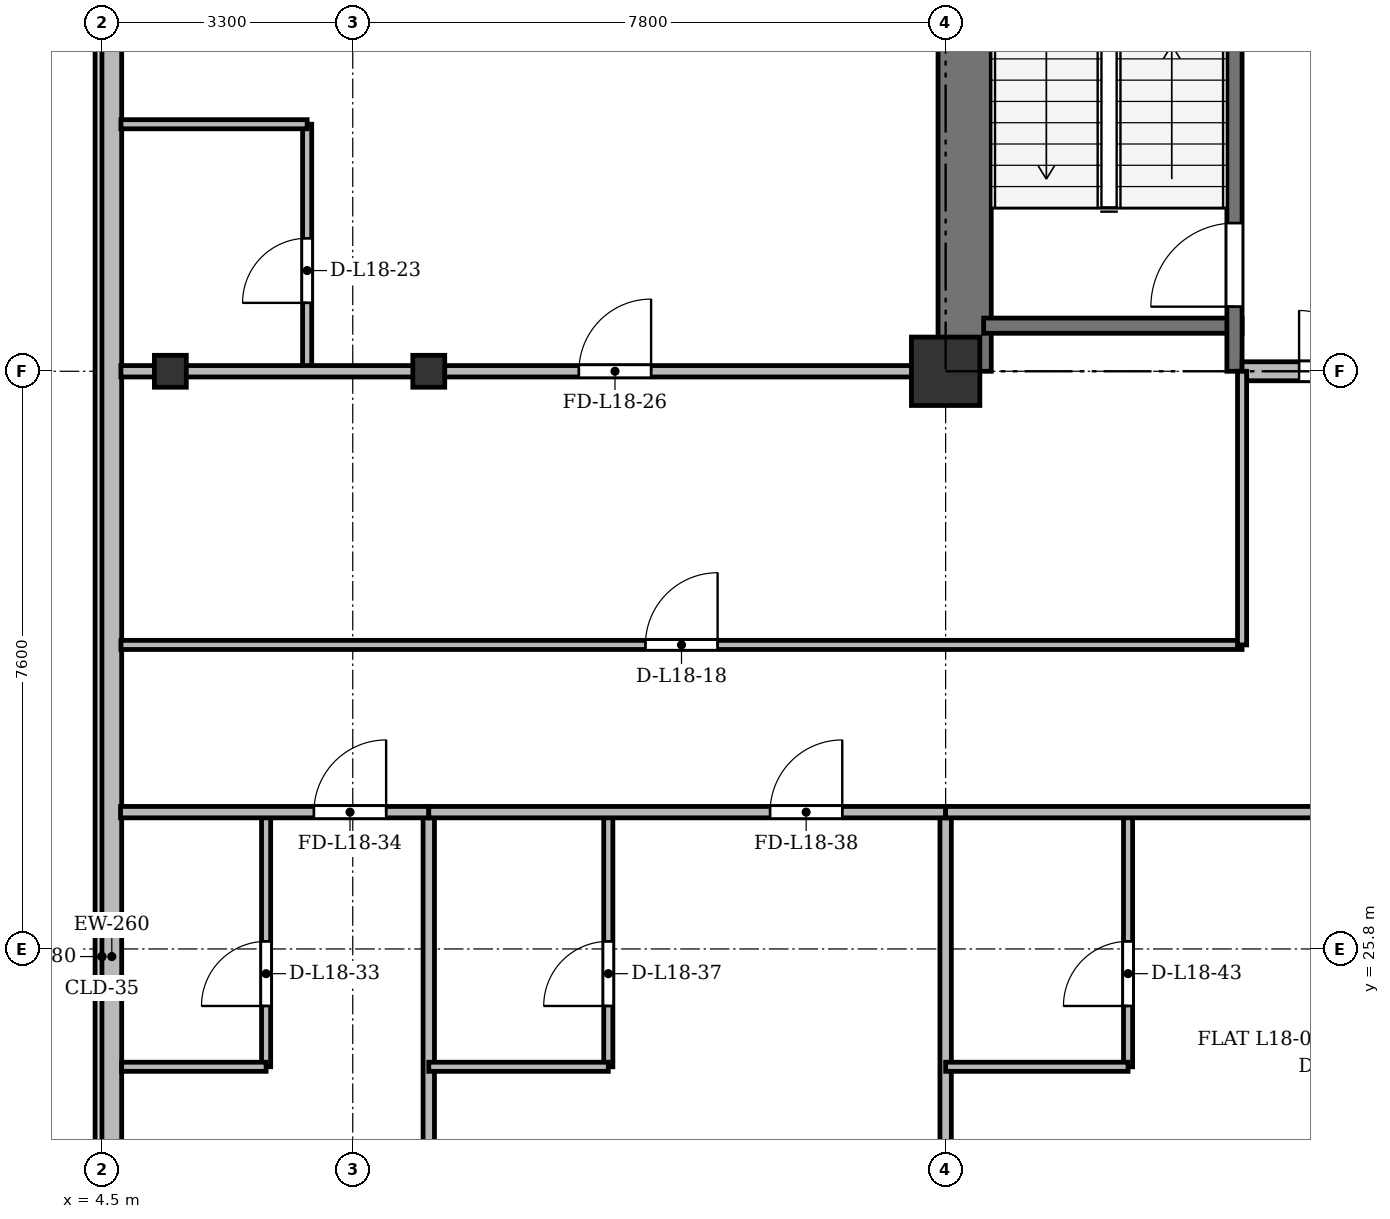
"""IFC4 building model, lengths in metres.
Left out: names, types, materials, properties, quantities, classifications, styles, units other than length and angle.
Written with IfcOpenShell. Run it as: python <this file> out.ifc"""

import sys

from ifc_helpers import new_model, si_unit, direction, frame, frame_2d, origin, origin_2d, place, context, subcontext, project, spatial, rectangle, i_section, extrude, source, transform, mapped, element, fill, save


model = new_model("IFC4")
c1 = context("Model", 3, precision=1e-05, world=origin(), true_north=direction((0.0, 1.0)))
c2 = subcontext(c1, "Body", "Model", "MODEL_VIEW")
j1 = project(units=[si_unit("LENGTHUNIT", "METRE"), si_unit("PLANEANGLEUNIT", "RADIAN")], contexts=[c1])
p1 = place(None, origin())
s1 = spatial("IfcSite", under=j1, at=p1, CompositionType="ELEMENT")
p2 = place(p1, origin())
s2 = spatial("IfcBuilding", under=s1, at=p2, CompositionType="ELEMENT")
p3 = place(p2, frame((0.0, 0.0, 70.3)))
s3 = spatial("IfcBuildingStorey", under=s2, at=p3, CompositionType="ELEMENT", Elevation=70.3)
m1 = source(origin(), c2, "Body", "SweptSolid", [
    extrude(i_section(OverallWidth=0.42, OverallDepth=0.42, WebThickness=0.026, FlangeThickness=0.04, at=origin_2d()), origin(), (0.0, 0.0, 1.0), 3.6),
])
for number, where, z_axis, x_axis in (
    (1, (5.4, 33.4, 0.0), (0.0, 0.0, 1.0), (1.0, 0.0, 0.0)),
    (2, (8.8, 33.4, 0.0), (0.0, 0.0, 1.0), (1.0, 0.0, 0.0)),
):
    element("IfcColumn", number, at=place(p3, frame(where, z_axis=z_axis, x_axis=x_axis)), inside=s3, PredefinedType="COLUMN", context=c2, shape_type="MappedRepresentation", body=[
        mapped(m1, transform((0.0, 0.0, 0.0), x_axis=(1.0, 0.0, 0.0), y_axis=(0.0, 1.0, 0.0), z_axis=(0.0, 0.0, 1.0), scale=1.0)),
    ])
m2 = source(origin(), c2, "Body", "SweptSolid", [
    extrude(rectangle(XDim=0.9, YDim=0.9, at=origin_2d()), origin(), (0.0, 0.0, 1.0), 3.6),
])
p4 = place(p3, frame((15.6, 33.4, 0.0), z_axis=(0.0, 0.0, 1.0), x_axis=(1.0, 0.0, 0.0)))
e3 = element("IfcColumn", 3, at=p4, inside=s3, PredefinedType="COLUMN", context=c2, shape_type="MappedRepresentation", body=[
    mapped(m2, transform((0.0, 0.0, 0.0), x_axis=(1.0, 0.0, 0.0), y_axis=(0.0, 1.0, 0.0), z_axis=(0.0, 0.0, 1.0), scale=1.0)),
])
p5 = place(p3, frame((4.63, 5.9, 0.0), z_axis=(0.0, 0.0, 1.0), x_axis=(0.0, 1.0, 0.0)))
e4 = element("IfcWall", 4, at=p5, inside=s3, PredefinedType="SOLIDWALL", context=c2, shape_type="SweptSolid", body=[
    extrude(rectangle(XDim=39.6, YDim=0.26, at=frame_2d((19.8, 0.0))), origin(), (0.0, 0.0, 1.0), 3.22),
])
p6 = place(p5, frame((1.45, 0.0, 0.92)))
e5 = element("IfcOpeningElement", 5, at=p6, cuts=e4, PredefinedType="OPENING", context=c2, shape_type="SweptSolid", body=[
    extrude(rectangle(XDim=1.2, YDim=1.65, at=frame_2d((0.6, 0.825))), frame((0.0, 0.14, 0.0), z_axis=(0.0, -1.0, 0.0), x_axis=(1.0, 0.0, 0.0)), (0.0, 0.0, 1.0), 0.28),
])
p7 = place(p5, frame((4.2, 0.0, 0.92)))
e6 = element("IfcOpeningElement", 6, at=p7, cuts=e4, PredefinedType="OPENING", context=c2, shape_type="SweptSolid", body=[
    extrude(rectangle(XDim=2.6, YDim=1.9, at=frame_2d((1.3, 0.95))), frame((0.0, 0.14, 0.0), z_axis=(0.0, -1.0, 0.0), x_axis=(1.0, 0.0, 0.0)), (0.0, 0.0, 1.0), 0.28),
])
p8 = place(p5, frame((8.4, 0.0, 0.92)))
e7 = element("IfcOpeningElement", 7, at=p8, cuts=e4, PredefinedType="OPENING", context=c2, shape_type="SweptSolid", body=[
    extrude(rectangle(XDim=2.6, YDim=1.9, at=frame_2d((1.3, 0.95))), frame((0.0, 0.14, 0.0), z_axis=(0.0, -1.0, 0.0), x_axis=(1.0, 0.0, 0.0)), (0.0, 0.0, 1.0), 0.28),
])
p9 = place(p5, frame((33.9, 0.0, 0.92)))
e8 = element("IfcOpeningElement", 8, at=p9, cuts=e4, PredefinedType="OPENING", context=c2, shape_type="SweptSolid", body=[
    extrude(rectangle(XDim=1.2, YDim=1.65, at=frame_2d((0.6, 0.825))), frame((0.0, 0.14, 0.0), z_axis=(0.0, -1.0, 0.0), x_axis=(1.0, 0.0, 0.0)), (0.0, 0.0, 1.0), 0.28),
])
p10 = place(p5, frame((37.25, 0.0, 0.92)))
e9 = element("IfcOpeningElement", 9, at=p10, cuts=e4, PredefinedType="OPENING", context=c2, shape_type="SweptSolid", body=[
    extrude(rectangle(XDim=1.2, YDim=1.65, at=frame_2d((0.6, 0.825))), frame((0.0, 0.14, 0.0), z_axis=(0.0, -1.0, 0.0), x_axis=(1.0, 0.0, 0.0)), (0.0, 0.0, 1.0), 0.28),
])
p11 = place(p3, frame((15.85, 33.4, 0.0), z_axis=(0.0, 0.0, 1.0), x_axis=(0.0, 1.0, 0.0)))
e10 = element("IfcWall", 10, at=p11, inside=s3, PredefinedType="SHEAR", context=c2, shape_type="SweptSolid", body=[
    extrude(rectangle(XDim=11.7, YDim=0.7, at=frame_2d((5.85, 0.0))), origin(), (0.0, 0.0, 1.0), 3.22),
])
p12 = place(p3, frame((16.1, 34.0, 0.0), z_axis=(0.0, 0.0, 1.0), x_axis=(1.0, 0.0, 0.0)))
e11 = element("IfcWall", 11, at=p12, inside=s3, PredefinedType="SHEAR", context=c2, shape_type="SweptSolid", body=[
    extrude(rectangle(XDim=3.4, YDim=0.2, at=frame_2d((1.7, 0.0))), origin(), (0.0, 0.0, 1.0), 3.22),
])
p13 = place(p3, frame((19.4, 33.4, 0.0), z_axis=(0.0, 0.0, 1.0), x_axis=(0.0, 1.0, 0.0)))
e12 = element("IfcWall", 12, at=p13, inside=s3, PredefinedType="SHEAR", context=c2, shape_type="SweptSolid", body=[
    extrude(rectangle(XDim=11.1, YDim=0.2, at=frame_2d((5.55, 0.0))), origin(), (0.0, 0.0, 1.0), 3.22),
])
p14 = place(p13, frame((0.85, 0.0, 0.0)))
e13 = element("IfcOpeningElement", 13, at=p14, cuts=e12, PredefinedType="OPENING", context=c2, shape_type="SweptSolid", body=[
    extrude(rectangle(XDim=1.1, YDim=2.15, at=frame_2d((0.55, 1.075))), frame((0.0, 0.11, 0.0), z_axis=(0.0, -1.0, 0.0), x_axis=(1.0, 0.0, 0.0)), (0.0, 0.0, 1.0), 0.22),
])
p15 = place(p3, frame((19.5, 33.4, 0.0), z_axis=(0.0, 0.0, 1.0), x_axis=(1.0, 0.0, 0.0)))
e14 = element("IfcWall", 14, at=p15, inside=s3, PredefinedType="PARTITIONING", context=c2, shape_type="SweptSolid", body=[
    extrude(rectangle(XDim=6.8, YDim=0.25, at=frame_2d((3.4, 0.0))), origin(), (0.0, 0.0, 1.0), 2.57),
])
p16 = place(p15, frame((0.75, 0.0, 0.0)))
e15 = element("IfcOpeningElement", 15, at=p16, cuts=e14, PredefinedType="OPENING", context=c2, shape_type="SweptSolid", body=[
    extrude(rectangle(XDim=1.6, YDim=2.2, at=frame_2d((0.8, 1.1))), frame((0.0, 0.135, 0.0), z_axis=(0.0, -1.0, 0.0), x_axis=(1.0, 0.0, 0.0)), (0.0, 0.0, 1.0), 0.27),
])
p17 = place(p3, frame((4.75, 29.8, 0.0), z_axis=(0.0, 0.0, 1.0), x_axis=(1.0, 0.0, 0.0)))
e16 = element("IfcWall", 16, at=p17, inside=s3, PredefinedType="PARTITIONING", context=c2, shape_type="SweptSolid", body=[
    extrude(rectangle(XDim=14.75, YDim=0.12, at=frame_2d((7.375, 0.0))), origin(), (0.0, 0.0, 1.0), 2.632),
])
p18 = place(p17, frame((6.9, 0.0, 0.0)))
e17 = element("IfcOpeningElement", 17, at=p18, cuts=e16, PredefinedType="OPENING", context=c2, shape_type="SweptSolid", body=[
    extrude(rectangle(XDim=0.95, YDim=2.15, at=frame_2d((0.475, 1.075))), frame((0.0, 0.07, 0.0), z_axis=(0.0, -1.0, 0.0), x_axis=(1.0, 0.0, 0.0)), (0.0, 0.0, 1.0), 0.14),
])
p19 = place(p3, frame((19.5, 29.8, 0.0), z_axis=(0.0, 0.0, 1.0), x_axis=(0.0, 1.0, 0.0)))
e18 = element("IfcWall", 18, at=p19, inside=s3, PredefinedType="PARTITIONING", context=c2, shape_type="SweptSolid", body=[
    extrude(rectangle(XDim=3.6, YDim=0.12, at=frame_2d((1.8, 0.0))), origin(), (0.0, 0.0, 1.0), 2.57),
])
p20 = place(p3, frame((7.2, 33.4, 0.0), z_axis=(0.0, 0.0, 1.0), x_axis=(0.0, 1.0, 0.0)))
e19 = element("IfcWall", 19, at=p20, inside=s3, PredefinedType="PARTITIONING", context=c2, shape_type="SweptSolid", body=[
    extrude(rectangle(XDim=3.25, YDim=0.12, at=frame_2d((1.625, 0.0))), origin(), (0.0, 0.0, 1.0), 2.57),
])
p21 = place(p20, frame((0.9, 0.0, 0.0)))
e20 = element("IfcOpeningElement", 20, at=p21, cuts=e19, PredefinedType="OPENING", context=c2, shape_type="SweptSolid", body=[
    extrude(rectangle(XDim=0.85, YDim=2.1, at=frame_2d((0.425, 1.05))), frame((0.0, 0.07, 0.0), z_axis=(0.0, -1.0, 0.0), x_axis=(1.0, 0.0, 0.0)), (0.0, 0.0, 1.0), 0.14),
])
p22 = place(p3, frame((4.75, 36.65, 0.0), z_axis=(0.0, 0.0, 1.0), x_axis=(1.0, 0.0, 0.0)))
e21 = element("IfcWall", 21, at=p22, inside=s3, PredefinedType="PARTITIONING", context=c2, shape_type="SweptSolid", body=[
    extrude(rectangle(XDim=2.45, YDim=0.12, at=frame_2d((1.225, 0.0))), origin(), (0.0, 0.0, 1.0), 2.632),
])
p23 = place(p3, frame((4.75, 33.4, 0.0), z_axis=(0.0, 0.0, 1.0), x_axis=(1.0, 0.0, 0.0)))
e22 = element("IfcWall", 22, at=p23, inside=s3, PredefinedType="PARTITIONING", context=c2, shape_type="SweptSolid", body=[
    extrude(rectangle(XDim=10.85, YDim=0.15, at=frame_2d((5.425, 0.0))), origin(), (0.0, 0.0, 1.0), 2.57),
])
p24 = place(p23, frame((6.025, 0.0, 0.0)))
e23 = element("IfcOpeningElement", 23, at=p24, cuts=e22, PredefinedType="OPENING", context=c2, shape_type="SweptSolid", body=[
    extrude(rectangle(XDim=0.95, YDim=2.15, at=frame_2d((0.475, 1.075))), frame((0.0, 0.085, 0.0), z_axis=(0.0, -1.0, 0.0), x_axis=(1.0, 0.0, 0.0)), (0.0, 0.0, 1.0), 0.17),
])
for number, where, z_axis, x_axis in (
    (24, (8.8, 3.145, 0.0), (0.0, 0.0, 1.0), (0.0, 1.0, 0.0)),
    (25, (15.6, 3.145, 0.0), (0.0, 0.0, 1.0), (0.0, 1.0, 0.0)),
):
    element("IfcWall", number, at=place(p3, frame(where, z_axis=z_axis, x_axis=x_axis)), inside=s3, PredefinedType="PARTITIONING", context=c2, shape_type="SweptSolid", body=[
        extrude(rectangle(XDim=24.455, YDim=0.15, at=frame_2d((12.228, 0.0))), origin(), (0.0, 0.0, 1.0), 2.632),
    ])
p25 = place(p3, frame((6.66, 24.25, 0.0), z_axis=(0.0, 0.0, 1.0), x_axis=(0.0, 1.0, 0.0)))
e26 = element("IfcWall", 26, at=p25, inside=s3, PredefinedType="PARTITIONING", context=c2, shape_type="SweptSolid", body=[
    extrude(rectangle(XDim=3.35, YDim=0.12, at=frame_2d((1.675, 0.0))), origin(), (0.0, 0.0, 1.0), 2.82),
])
p26 = place(p25, frame((0.8, 0.0, 0.0)))
e27 = element("IfcOpeningElement", 27, at=p26, cuts=e26, PredefinedType="OPENING", context=c2, shape_type="SweptSolid", body=[
    extrude(rectangle(XDim=0.85, YDim=2.1, at=frame_2d((0.425, 1.05))), frame((0.0, 0.07, 0.0), z_axis=(0.0, -1.0, 0.0), x_axis=(1.0, 0.0, 0.0)), (0.0, 0.0, 1.0), 0.14),
])
p27 = place(p3, frame((4.76, 24.25, 0.0), z_axis=(0.0, 0.0, 1.0), x_axis=(1.0, 0.0, 0.0)))
e28 = element("IfcWall", 28, at=p27, inside=s3, PredefinedType="PARTITIONING", context=c2, shape_type="SweptSolid", body=[
    extrude(rectangle(XDim=1.9, YDim=0.12, at=frame_2d((0.95, 0.0))), origin(), (0.0, 0.0, 1.0), 2.632),
])
p28 = place(p3, frame((4.745, 27.6, 0.0), z_axis=(0.0, 0.0, 1.0), x_axis=(1.0, 0.0, 0.0)))
e29 = element("IfcWall", 29, at=p28, inside=s3, PredefinedType="PARTITIONING", context=c2, shape_type="SweptSolid", body=[
    extrude(rectangle(XDim=4.055, YDim=0.15, at=frame_2d((2.027, 0.0))), origin(), (0.0, 0.0, 1.0), 2.632),
])
p29 = place(p28, frame((2.544, 0.0, 0.0)))
e30 = element("IfcOpeningElement", 30, at=p29, cuts=e29, PredefinedType="OPENING", context=c2, shape_type="SweptSolid", body=[
    extrude(rectangle(XDim=0.95, YDim=2.15, at=frame_2d((0.475, 1.075))), frame((0.0, 0.085, 0.0), z_axis=(0.0, -1.0, 0.0), x_axis=(1.0, 0.0, 0.0)), (0.0, 0.0, 1.0), 0.17),
])
p30 = place(p3, frame((11.162, 24.25, 0.0), z_axis=(0.0, 0.0, 1.0), x_axis=(0.0, 1.0, 0.0)))
e31 = element("IfcWall", 31, at=p30, inside=s3, PredefinedType="PARTITIONING", context=c2, shape_type="SweptSolid", body=[
    extrude(rectangle(XDim=3.35, YDim=0.12, at=frame_2d((1.675, 0.0))), origin(), (0.0, 0.0, 1.0), 2.82),
])
p31 = place(p30, frame((0.8, 0.0, 0.0)))
e32 = element("IfcOpeningElement", 32, at=p31, cuts=e31, PredefinedType="OPENING", context=c2, shape_type="SweptSolid", body=[
    extrude(rectangle(XDim=0.85, YDim=2.1, at=frame_2d((0.425, 1.05))), frame((0.0, 0.07, 0.0), z_axis=(0.0, -1.0, 0.0), x_axis=(1.0, 0.0, 0.0)), (0.0, 0.0, 1.0), 0.14),
])
p32 = place(p3, frame((8.8, 24.25, 0.0), z_axis=(0.0, 0.0, 1.0), x_axis=(1.0, 0.0, 0.0)))
e33 = element("IfcWall", 33, at=p32, inside=s3, PredefinedType="PARTITIONING", context=c2, shape_type="SweptSolid", body=[
    extrude(rectangle(XDim=2.362, YDim=0.12, at=frame_2d((1.181, 0.0))), origin(), (0.0, 0.0, 1.0), 2.632),
])
p33 = place(p3, frame((8.8, 27.6, 0.0), z_axis=(0.0, 0.0, 1.0), x_axis=(1.0, 0.0, 0.0)))
e34 = element("IfcWall", 34, at=p33, inside=s3, PredefinedType="PARTITIONING", context=c2, shape_type="SweptSolid", body=[
    extrude(rectangle(XDim=6.8, YDim=0.15, at=frame_2d((3.4, 0.0))), origin(), (0.0, 0.0, 1.0), 2.632),
])
p34 = place(p33, frame((4.49, 0.0, 0.0)))
e35 = element("IfcOpeningElement", 35, at=p34, cuts=e34, PredefinedType="OPENING", context=c2, shape_type="SweptSolid", body=[
    extrude(rectangle(XDim=0.95, YDim=2.15, at=frame_2d((0.475, 1.075))), frame((0.0, 0.085, 0.0), z_axis=(0.0, -1.0, 0.0), x_axis=(1.0, 0.0, 0.0)), (0.0, 0.0, 1.0), 0.17),
])
p35 = place(p3, frame((18.0, 24.25, 0.0), z_axis=(0.0, 0.0, 1.0), x_axis=(0.0, 1.0, 0.0)))
e36 = element("IfcWall", 36, at=p35, inside=s3, PredefinedType="PARTITIONING", context=c2, shape_type="SweptSolid", body=[
    extrude(rectangle(XDim=3.35, YDim=0.12, at=frame_2d((1.675, 0.0))), origin(), (0.0, 0.0, 1.0), 2.82),
])
p36 = place(p35, frame((0.8, 0.0, 0.0)))
e37 = element("IfcOpeningElement", 37, at=p36, cuts=e36, PredefinedType="OPENING", context=c2, shape_type="SweptSolid", body=[
    extrude(rectangle(XDim=0.85, YDim=2.1, at=frame_2d((0.425, 1.05))), frame((0.0, 0.07, 0.0), z_axis=(0.0, -1.0, 0.0), x_axis=(1.0, 0.0, 0.0)), (0.0, 0.0, 1.0), 0.14),
])
p37 = place(p3, frame((15.6, 24.25, 0.0), z_axis=(0.0, 0.0, 1.0), x_axis=(1.0, 0.0, 0.0)))
e38 = element("IfcWall", 38, at=p37, inside=s3, PredefinedType="PARTITIONING", context=c2, shape_type="SweptSolid", body=[
    extrude(rectangle(XDim=2.4, YDim=0.12, at=frame_2d((1.2, 0.0))), origin(), (0.0, 0.0, 1.0), 2.632),
])
p38 = place(p3, frame((15.6, 27.6, 0.0), z_axis=(0.0, 0.0, 1.0), x_axis=(1.0, 0.0, 0.0)))
e39 = element("IfcWall", 39, at=p38, inside=s3, PredefinedType="PARTITIONING", context=c2, shape_type="SweptSolid", body=[
    extrude(rectangle(XDim=7.8, YDim=0.15, at=frame_2d((3.9, 0.0))), origin(), (0.0, 0.0, 1.0), 2.632),
])
p39 = place(p38, frame((5.172, 0.0, 0.0)))
e40 = element("IfcOpeningElement", 40, at=p39, cuts=e39, PredefinedType="OPENING", context=c2, shape_type="SweptSolid", body=[
    extrude(rectangle(XDim=0.95, YDim=2.15, at=frame_2d((0.475, 1.075))), frame((0.0, 0.085, 0.0), z_axis=(0.0, -1.0, 0.0), x_axis=(1.0, 0.0, 0.0)), (0.0, 0.0, 1.0), 0.17),
])
m3 = source(origin(), c2, "Body", "SweptSolid", [
    extrude(rectangle(XDim=1.1, YDim=2.15, at=frame_2d((0.55, 1.075))), frame((0.0, 0.025, 0.0), z_axis=(0.0, -1.0, 0.0), x_axis=(1.0, 0.0, 0.0)), (0.0, 0.0, 1.0), 0.05),
])
p40 = place(p14, origin())
e41 = element("IfcDoor", 41, at=p40, inside=s3, OperationType="SINGLE_SWING_LEFT", PredefinedType="DOOR", context=c2, shape_type="MappedRepresentation", body=[
    mapped(m3, transform((0.0, 0.0, 0.0), x_axis=(1.0, 0.0, 0.0), y_axis=(0.0, 1.0, 0.0), z_axis=(0.0, 0.0, 1.0), scale=1.0)),
])
fill(e13, e41)
m4 = source(origin(), c2, "Body", "SweptSolid", [
    extrude(rectangle(XDim=1.6, YDim=2.2, at=frame_2d((0.8, 1.1))), frame((0.0, 0.025, 0.0), z_axis=(0.0, -1.0, 0.0), x_axis=(1.0, 0.0, 0.0)), (0.0, 0.0, 1.0), 0.05),
])
p41 = place(p16, origin())
e42 = element("IfcDoor", 42, at=p41, inside=s3, OperationType="DOUBLE_DOOR_SINGLE_SWING", PredefinedType="DOOR", context=c2, shape_type="MappedRepresentation", body=[
    mapped(m4, transform((0.0, 0.0, 0.0), x_axis=(1.0, 0.0, 0.0), y_axis=(0.0, 1.0, 0.0), z_axis=(0.0, 0.0, 1.0), scale=1.0)),
])
fill(e15, e42)
m5 = source(origin(), c2, "Body", "SweptSolid", [
    extrude(rectangle(XDim=0.95, YDim=2.15, at=frame_2d((0.475, 1.075))), frame((0.0, 0.025, 0.0), z_axis=(0.0, -1.0, 0.0), x_axis=(1.0, 0.0, 0.0)), (0.0, 0.0, 1.0), 0.05),
])
p42 = place(p18, origin())
e43 = element("IfcDoor", 43, at=p42, inside=s3, OperationType="SINGLE_SWING_RIGHT", PredefinedType="DOOR", context=c2, shape_type="MappedRepresentation", body=[
    mapped(m5, transform((0.0, 0.0, 0.0), x_axis=(1.0, 0.0, 0.0), y_axis=(0.0, 1.0, 0.0), z_axis=(0.0, 0.0, 1.0), scale=1.0)),
])
fill(e17, e43)
m6 = source(origin(), c2, "Body", "SweptSolid", [
    extrude(rectangle(XDim=0.85, YDim=2.1, at=frame_2d((0.425, 1.05))), frame((0.0, 0.025, 0.0), z_axis=(0.0, -1.0, 0.0), x_axis=(1.0, 0.0, 0.0)), (0.0, 0.0, 1.0), 0.05),
])
p43 = place(p21, origin())
e44 = element("IfcDoor", 44, at=p43, inside=s3, OperationType="SINGLE_SWING_LEFT", PredefinedType="DOOR", context=c2, shape_type="MappedRepresentation", body=[
    mapped(m6, transform((0.0, 0.0, 0.0), x_axis=(1.0, 0.0, 0.0), y_axis=(0.0, 1.0, 0.0), z_axis=(0.0, 0.0, 1.0), scale=1.0)),
])
fill(e20, e44)
p44 = place(p24, origin())
e45 = element("IfcDoor", 45, at=p44, inside=s3, OperationType="SINGLE_SWING_RIGHT", PredefinedType="DOOR", context=c2, shape_type="MappedRepresentation", body=[
    mapped(m5, transform((0.0, 0.0, 0.0), x_axis=(1.0, 0.0, 0.0), y_axis=(0.0, 1.0, 0.0), z_axis=(0.0, 0.0, 1.0), scale=1.0)),
])
fill(e23, e45)
p45 = place(p26, origin())
e46 = element("IfcDoor", 46, at=p45, inside=s3, OperationType="SINGLE_SWING_LEFT", PredefinedType="DOOR", context=c2, shape_type="MappedRepresentation", body=[
    mapped(m6, transform((0.0, 0.0, 0.0), x_axis=(1.0, 0.0, 0.0), y_axis=(0.0, 1.0, 0.0), z_axis=(0.0, 0.0, 1.0), scale=1.0)),
])
fill(e27, e46)
p46 = place(p29, origin())
e47 = element("IfcDoor", 47, at=p46, inside=s3, OperationType="SINGLE_SWING_RIGHT", PredefinedType="DOOR", context=c2, shape_type="MappedRepresentation", body=[
    mapped(m5, transform((0.0, 0.0, 0.0), x_axis=(1.0, 0.0, 0.0), y_axis=(0.0, 1.0, 0.0), z_axis=(0.0, 0.0, 1.0), scale=1.0)),
])
fill(e30, e47)
p47 = place(p31, origin())
e48 = element("IfcDoor", 48, at=p47, inside=s3, OperationType="SINGLE_SWING_LEFT", PredefinedType="DOOR", context=c2, shape_type="MappedRepresentation", body=[
    mapped(m6, transform((0.0, 0.0, 0.0), x_axis=(1.0, 0.0, 0.0), y_axis=(0.0, 1.0, 0.0), z_axis=(0.0, 0.0, 1.0), scale=1.0)),
])
fill(e32, e48)
p48 = place(p34, origin())
e49 = element("IfcDoor", 49, at=p48, inside=s3, OperationType="SINGLE_SWING_RIGHT", PredefinedType="DOOR", context=c2, shape_type="MappedRepresentation", body=[
    mapped(m5, transform((0.0, 0.0, 0.0), x_axis=(1.0, 0.0, 0.0), y_axis=(0.0, 1.0, 0.0), z_axis=(0.0, 0.0, 1.0), scale=1.0)),
])
fill(e35, e49)
p49 = place(p36, origin())
e50 = element("IfcDoor", 50, at=p49, inside=s3, OperationType="SINGLE_SWING_LEFT", PredefinedType="DOOR", context=c2, shape_type="MappedRepresentation", body=[
    mapped(m6, transform((0.0, 0.0, 0.0), x_axis=(1.0, 0.0, 0.0), y_axis=(0.0, 1.0, 0.0), z_axis=(0.0, 0.0, 1.0), scale=1.0)),
])
fill(e37, e50)
save(model, sys.argv[1])
